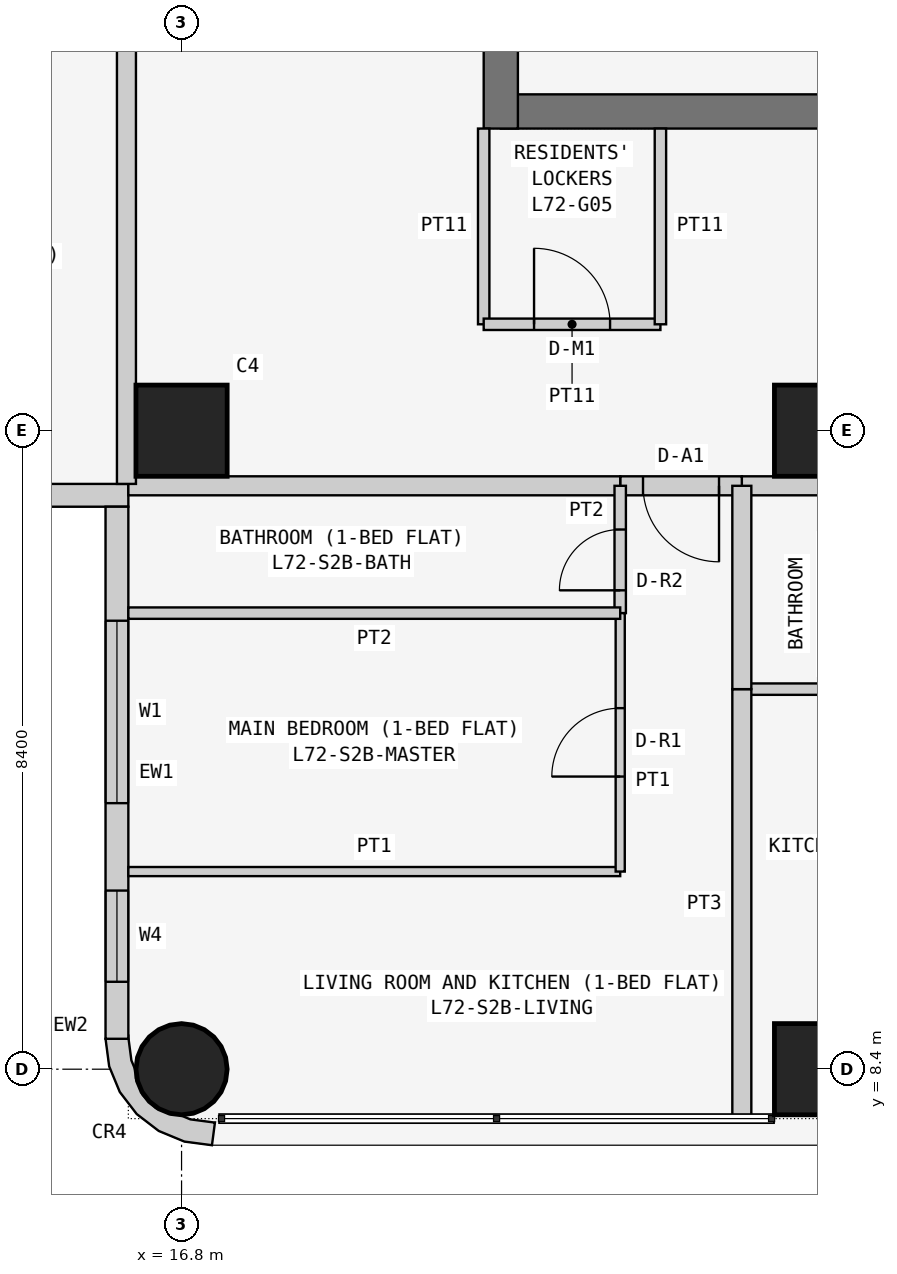
"""IFC4 building model, lengths in metres.
Left out: names, types, materials, properties, quantities, classifications, styles, units other than length and angle.
Written with IfcOpenShell. Run it as: python <this file> out.ifc"""

import sys

from ifc_helpers import new_model, si_unit, direction, frame, frame_2d, origin, origin_2d, place, context, subcontext, project, spatial, polyline, rectangle, circle, outline, extrude, element, fill, save


model = new_model("IFC4")
c1 = context("Model", 3, precision=1e-05, world=origin(), true_north=direction((0.0, 1.0)))
c2 = subcontext(c1, "Body", "Model", "MODEL_VIEW")
j1 = project(units=[si_unit("LENGTHUNIT", "METRE"), si_unit("PLANEANGLEUNIT", "RADIAN")], contexts=[c1])
p1 = place(None, origin())
s1 = spatial("IfcSite", under=j1, at=p1, CompositionType="ELEMENT")
p2 = place(p1, origin())
s2 = spatial("IfcBuilding", under=s1, at=p2, CompositionType="ELEMENT")
p3 = place(p2, frame((0.0, 0.0, 275.7)))
s3 = spatial("IfcBuildingStorey", under=s2, at=p3, CompositionType="ELEMENT", Elevation=275.7)
p4 = place(p3, frame((16.8, 8.4, 0.0), z_axis=(0.0, 0.0, 1.0), x_axis=(1.0, 0.0, 0.0)))
e1 = element("IfcColumn", 1, at=p4, inside=s3, PredefinedType="COLUMN", context=c2, shape_type="SweptSolid", body=[
    extrude(circle(Radius=0.6, at=origin_2d()), origin(), (0.0, 0.0, 1.0), 3.6),
])
for number, where, z_axis, x_axis in (
    (2, (16.8, 16.8, 0.0), (0.0, 0.0, 1.0), (1.0, 0.0, 0.0)),
    (3, (25.2, 8.4, 0.0), (0.0, 0.0, 1.0), (1.0, 0.0, 0.0)),
    (4, (25.2, 16.8, 0.0), (0.0, 0.0, 1.0), (1.0, 0.0, 0.0)),
):
    element("IfcColumn", number, at=place(p3, frame(where, z_axis=z_axis, x_axis=x_axis)), inside=s3, PredefinedType="COLUMN", context=c2, shape_type="SweptSolid", body=[
        extrude(rectangle(XDim=1.2, YDim=1.2, at=origin_2d()), origin(), (0.0, 0.0, 1.0), 3.6),
    ])
p5 = place(p3, frame((21.0, 21.0, 0.0), z_axis=(0.0, 0.0, 1.0), x_axis=(1.0, 0.0, 0.0)))
e5 = element("IfcWall", 5, at=p5, inside=s3, PredefinedType="SHEAR", context=c2, shape_type="SweptSolid", body=[
    extrude(rectangle(XDim=17.025, YDim=0.45, at=frame_2d((8.512, 0.0))), origin(), (0.0, 0.0, 1.0), 3.6),
])
p6 = place(p3, frame((21.0, 37.8, 0.0), z_axis=(0.0, 0.0, 1.0), x_axis=(0.0, -1.0, 0.0)))
e6 = element("IfcWall", 6, at=p6, inside=s3, PredefinedType="SHEAR", context=c2, shape_type="SweptSolid", body=[
    extrude(rectangle(XDim=17.025, YDim=0.45, at=frame_2d((8.513, 0.0))), origin(), (0.0, 0.0, 1.0), 3.6),
])
p7 = place(p6, frame((5.4, 0.0, 0.0)))
e7 = element("IfcOpeningElement", 7, at=p7, cuts=e6, PredefinedType="OPENING", context=c2, shape_type="SweptSolid", body=[
    extrude(rectangle(XDim=1.2, YDim=2.1, at=frame_2d((0.6, 1.05))), frame((0.0, 0.235, 0.0), z_axis=(0.0, -1.0, 0.0), x_axis=(1.0, 0.0, 0.0)), (0.0, 0.0, 1.0), 0.47),
])
p8 = place(p3, frame((8.8, 15.95, 0.0), z_axis=(0.0, 0.0, 1.0), x_axis=(1.0, 0.0, 0.0)))
e8 = element("IfcWall", 8, at=p8, inside=s3, PredefinedType="SOLIDWALL", context=c2, shape_type="SweptSolid", body=[
    extrude(rectangle(XDim=7.3, YDim=0.3, at=frame_2d((3.65, 0.0))), origin(), (0.0, 0.0, 1.0), 3.45),
])
p9 = place(p8, frame((3.1, 0.0, 0.9)))
e9 = element("IfcOpeningElement", 9, at=p9, cuts=e8, PredefinedType="OPENING", context=c2, shape_type="SweptSolid", body=[
    extrude(rectangle(XDim=2.4, YDim=1.5, at=frame_2d((1.2, 0.75))), frame((0.0, 0.16, 0.0), z_axis=(0.0, -1.0, 0.0), x_axis=(1.0, 0.0, 0.0)), (0.0, 0.0, 1.0), 0.32),
])
p10 = place(p8, frame((0.75, 0.0, 0.9)))
e10 = element("IfcOpeningElement", 10, at=p10, cuts=e8, PredefinedType="OPENING", context=c2, shape_type="SweptSolid", body=[
    extrude(rectangle(XDim=1.2, YDim=1.5, at=frame_2d((0.6, 0.75))), frame((0.0, 0.16, 0.0), z_axis=(0.0, -1.0, 0.0), x_axis=(1.0, 0.0, 0.0)), (0.0, 0.0, 1.0), 0.32),
])
p11 = place(p3, frame((15.95, 15.8, 0.0), z_axis=(0.0, 0.0, 1.0), x_axis=(0.0, -1.0, 0.0)))
e11 = element("IfcWall", 11, at=p11, inside=s3, PredefinedType="SOLIDWALL", context=c2, shape_type="SweptSolid", body=[
    extrude(rectangle(XDim=7.0, YDim=0.3, at=frame_2d((3.5, 0.0))), origin(), (0.0, 0.0, 1.0), 3.45),
])
p12 = place(p11, frame((1.5, 0.0, 0.9)))
e12 = element("IfcOpeningElement", 12, at=p12, cuts=e11, PredefinedType="OPENING", context=c2, shape_type="SweptSolid", body=[
    extrude(rectangle(XDim=2.4, YDim=1.5, at=frame_2d((1.2, 0.75))), frame((0.0, 0.16, 0.0), z_axis=(0.0, -1.0, 0.0), x_axis=(1.0, 0.0, 0.0)), (0.0, 0.0, 1.0), 0.32),
])
p13 = place(p11, frame((5.05, 0.0, 0.9)))
e13 = element("IfcOpeningElement", 13, at=p13, cuts=e11, PredefinedType="OPENING", context=c2, shape_type="SweptSolid", body=[
    extrude(rectangle(XDim=1.2, YDim=1.5, at=frame_2d((0.6, 0.75))), frame((0.0, 0.16, 0.0), z_axis=(0.0, -1.0, 0.0), x_axis=(1.0, 0.0, 0.0)), (0.0, 0.0, 1.0), 0.32),
])
p14 = place(p3, frame((16.224, 8.762, 0.0), z_axis=(0.0, 0.0, 1.0), x_axis=(-0.707106781187, -0.707106781187, 0.0)))
e14 = element("IfcWall", 14, at=p14, inside=s3, PredefinedType="SOLIDWALL", context=c2, shape_type="SweptSolid", body=[
    extrude(outline(polyline([(0.033, 1.469), (0.047, 1.455), (0.233, 1.212), (0.292, 1.069), (0.358, 1.003), (0.449, 0.783), (0.449, 0.543), (0.358, 0.322), (0.292, 0.257), (0.233, 0.114), (0.047, -0.129), (0.033, -0.143), (0.273, -0.327), (0.495, -0.037), (0.635, 0.3), (0.683, 0.663), (0.635, 1.025), (0.495, 1.363), (0.273, 1.653), (0.033, 1.469)])), origin(), (0.0, 0.0, 1.0), 3.45),
])
p15 = place(p3, frame((20.775, 20.775, 0.0), z_axis=(0.0, 0.0, 1.0), x_axis=(0.0, -1.0, 0.0)))
e15 = element("IfcWall", 15, at=p15, inside=s3, PredefinedType="PARTITIONING", context=c2, shape_type="SweptSolid", body=[
    extrude(rectangle(XDim=2.575, YDim=0.15, at=frame_2d((1.288, 0.0))), origin(), (0.0, 0.0, 1.0), 3.45),
])
p16 = place(p3, frame((20.775, 18.2, 0.0), z_axis=(0.0, 0.0, 1.0), x_axis=(1.0, 0.0, 0.0)))
e16 = element("IfcWall", 16, at=p16, inside=s3, PredefinedType="PARTITIONING", context=c2, shape_type="SweptSolid", body=[
    extrude(rectangle(XDim=2.325, YDim=0.15, at=frame_2d((1.163, 0.0))), origin(), (0.0, 0.0, 1.0), 3.45),
])
p17 = place(p16, frame((0.663, 0.0, 0.0)))
e17 = element("IfcOpeningElement", 17, at=p17, cuts=e16, PredefinedType="OPENING", context=c2, shape_type="SweptSolid", body=[
    extrude(rectangle(XDim=1.0, YDim=2.1, at=frame_2d((0.5, 1.05))), frame((0.0, 0.085, 0.0), z_axis=(0.0, -1.0, 0.0), x_axis=(1.0, 0.0, 0.0)), (0.0, 0.0, 1.0), 0.17),
])
p18 = place(p3, frame((23.1, 18.2, 0.0), z_axis=(0.0, 0.0, 1.0), x_axis=(0.0, 1.0, 0.0)))
e18 = element("IfcWall", 18, at=p18, inside=s3, PredefinedType="PARTITIONING", context=c2, shape_type="SweptSolid", body=[
    extrude(rectangle(XDim=2.575, YDim=0.15, at=frame_2d((1.288, 0.0))), origin(), (0.0, 0.0, 1.0), 3.45),
])
p19 = place(p3, frame((26.8, 16.075, 0.0), z_axis=(0.0, 0.0, 1.0), x_axis=(-1.0, 0.0, 0.0)))
e19 = element("IfcWall", 19, at=p19, inside=s3, PredefinedType="PARTITIONING", context=c2, shape_type="SweptSolid", body=[
    extrude(rectangle(XDim=2.629, YDim=0.25, at=frame_2d((1.314, 0.0))), origin(), (0.0, 0.0, 1.0), 3.45),
])
p20 = place(p3, frame((24.171, 16.075, 0.0), z_axis=(0.0, 0.0, 1.0), x_axis=(-1.0, 0.0, 0.0)))
e20 = element("IfcWall", 20, at=p20, inside=s3, PredefinedType="PARTITIONING", context=c2, shape_type="SweptSolid", body=[
    extrude(rectangle(XDim=1.6, YDim=0.25, at=frame_2d((0.8, 0.0))), origin(), (0.0, 0.0, 1.0), 3.45),
])
p21 = place(p20, frame((0.3, 0.0, 0.0)))
e21 = element("IfcOpeningElement", 21, at=p21, cuts=e20, PredefinedType="OPENING", context=c2, shape_type="SweptSolid", body=[
    extrude(rectangle(XDim=1.0, YDim=2.1, at=frame_2d((0.5, 1.05))), frame((0.0, 0.135, 0.0), z_axis=(0.0, -1.0, 0.0), x_axis=(1.0, 0.0, 0.0)), (0.0, 0.0, 1.0), 0.27),
])
p22 = place(p3, frame((22.571, 16.075, 0.0), z_axis=(0.0, 0.0, 1.0), x_axis=(-1.0, 0.0, 0.0)))
e22 = element("IfcWall", 22, at=p22, inside=s3, PredefinedType="PARTITIONING", context=c2, shape_type="SweptSolid", body=[
    extrude(rectangle(XDim=6.471, YDim=0.25, at=frame_2d((3.235, 0.0))), origin(), (0.0, 0.0, 1.0), 3.45),
])
p23 = place(p3, frame((16.075, 16.1, 0.0), z_axis=(0.0, 0.0, 1.0), x_axis=(0.0, 1.0, 0.0)))
e23 = element("IfcWall", 23, at=p23, inside=s3, PredefinedType="PARTITIONING", context=c2, shape_type="SweptSolid", body=[
    extrude(rectangle(XDim=6.871, YDim=0.25, at=frame_2d((3.436, 0.0))), origin(), (0.0, 0.0, 1.0), 3.45),
])
p24 = place(p3, frame((24.171, 13.4, 0.0), z_axis=(0.0, 0.0, 1.0), x_axis=(1.0, 0.0, 0.0)))
e24 = element("IfcWall", 24, at=p24, inside=s3, PredefinedType="PARTITIONING", context=c2, shape_type="SweptSolid", body=[
    extrude(rectangle(XDim=2.629, YDim=0.15, at=frame_2d((1.314, 0.0))), origin(), (0.0, 0.0, 1.0), 3.45),
])
p25 = place(p3, frame((24.171, 7.75, 0.0), z_axis=(0.0, 0.0, 1.0), x_axis=(0.0, 1.0, 0.0)))
e25 = element("IfcWall", 25, at=p25, inside=s3, PredefinedType="PARTITIONING", context=c2, shape_type="SweptSolid", body=[
    extrude(rectangle(XDim=5.65, YDim=0.25, at=frame_2d((2.825, 0.0))), origin(), (0.0, 0.0, 1.0), 3.45),
])
p26 = place(p3, frame((24.171, 13.4, 0.0), z_axis=(0.0, 0.0, 1.0), x_axis=(0.0, 1.0, 0.0)))
e26 = element("IfcWall", 26, at=p26, inside=s3, PredefinedType="PARTITIONING", context=c2, shape_type="SweptSolid", body=[
    extrude(rectangle(XDim=2.675, YDim=0.25, at=frame_2d((1.337, 0.0))), origin(), (0.0, 0.0, 1.0), 3.45),
])
p27 = place(p3, frame((22.571, 14.4, 0.0), z_axis=(0.0, 0.0, 1.0), x_axis=(0.0, 1.0, 0.0)))
e27 = element("IfcWall", 27, at=p27, inside=s3, PredefinedType="PARTITIONING", context=c2, shape_type="SweptSolid", body=[
    extrude(rectangle(XDim=1.675, YDim=0.15, at=frame_2d((0.837, 0.0))), origin(), (0.0, 0.0, 1.0), 3.45),
])
p28 = place(p27, frame((0.3, 0.0, 0.0)))
e28 = element("IfcOpeningElement", 28, at=p28, cuts=e27, PredefinedType="OPENING", context=c2, shape_type="SweptSolid", body=[
    extrude(rectangle(XDim=0.8, YDim=2.1, at=frame_2d((0.4, 1.05))), frame((0.0, 0.085, 0.0), z_axis=(0.0, -1.0, 0.0), x_axis=(1.0, 0.0, 0.0)), (0.0, 0.0, 1.0), 0.17),
])
p29 = place(p3, frame((16.1, 11.0, 0.0), z_axis=(0.0, 0.0, 1.0), x_axis=(1.0, 0.0, 0.0)))
e29 = element("IfcWall", 29, at=p29, inside=s3, PredefinedType="PARTITIONING", context=c2, shape_type="SweptSolid", body=[
    extrude(rectangle(XDim=6.471, YDim=0.12, at=frame_2d((3.235, 0.0))), origin(), (0.0, 0.0, 1.0), 3.45),
])
p30 = place(p3, frame((22.571, 11.0, 0.0), z_axis=(0.0, 0.0, 1.0), x_axis=(0.0, 1.0, 0.0)))
e30 = element("IfcWall", 30, at=p30, inside=s3, PredefinedType="PARTITIONING", context=c2, shape_type="SweptSolid", body=[
    extrude(rectangle(XDim=3.4, YDim=0.12, at=frame_2d((1.7, 0.0))), origin(), (0.0, 0.0, 1.0), 3.45),
])
p31 = place(p30, frame((1.25, 0.0, 0.0)))
e31 = element("IfcOpeningElement", 31, at=p31, cuts=e30, PredefinedType="OPENING", context=c2, shape_type="SweptSolid", body=[
    extrude(rectangle(XDim=0.9, YDim=2.1, at=frame_2d((0.45, 1.05))), frame((0.0, 0.07, 0.0), z_axis=(0.0, -1.0, 0.0), x_axis=(1.0, 0.0, 0.0)), (0.0, 0.0, 1.0), 0.14),
])
p32 = place(p3, frame((22.571, 14.4, 0.0), z_axis=(0.0, 0.0, 1.0), x_axis=(-1.0, 0.0, 0.0)))
e32 = element("IfcWall", 32, at=p32, inside=s3, PredefinedType="PARTITIONING", context=c2, shape_type="SweptSolid", body=[
    extrude(rectangle(XDim=6.471, YDim=0.15, at=frame_2d((3.235, 0.0))), origin(), (0.0, 0.0, 1.0), 3.45),
])
p33 = place(p12, origin())
e33 = element("IfcWindow", 33, at=p33, inside=s3, PartitioningType="SINGLE_PANEL", PredefinedType="WINDOW", context=c2, shape_type="SweptSolid", body=[
    extrude(rectangle(XDim=2.4, YDim=1.5, at=frame_2d((1.2, 0.75))), frame((0.0, 0.03, 0.0), z_axis=(0.0, -1.0, 0.0), x_axis=(1.0, 0.0, 0.0)), (0.0, 0.0, 1.0), 0.06),
])
fill(e12, e33)
p34 = place(p13, origin())
e34 = element("IfcWindow", 34, at=p34, inside=s3, PartitioningType="SINGLE_PANEL", PredefinedType="WINDOW", context=c2, shape_type="SweptSolid", body=[
    extrude(rectangle(XDim=1.2, YDim=1.5, at=frame_2d((0.6, 0.75))), frame((0.0, 0.03, 0.0), z_axis=(0.0, -1.0, 0.0), x_axis=(1.0, 0.0, 0.0)), (0.0, 0.0, 1.0), 0.06),
])
fill(e13, e34)
p35 = place(p17, origin())
e35 = element("IfcDoor", 35, at=p35, inside=s3, OperationType="SINGLE_SWING_LEFT", PredefinedType="DOOR", context=c2, shape_type="SweptSolid", body=[
    extrude(rectangle(XDim=1.0, YDim=2.1, at=frame_2d((0.5, 1.05))), frame((0.0, 0.025, 0.0), z_axis=(0.0, -1.0, 0.0), x_axis=(1.0, 0.0, 0.0)), (0.0, 0.0, 1.0), 0.05),
])
fill(e17, e35)
p36 = place(p21, origin())
e36 = element("IfcDoor", 36, at=p36, inside=s3, OperationType="SINGLE_SWING_LEFT", PredefinedType="DOOR", context=c2, shape_type="SweptSolid", body=[
    extrude(rectangle(XDim=1.0, YDim=2.1, at=frame_2d((0.5, 1.05))), frame((0.0, 0.025, 0.0), z_axis=(0.0, -1.0, 0.0), x_axis=(1.0, 0.0, 0.0)), (0.0, 0.0, 1.0), 0.05),
])
fill(e21, e36)
p37 = place(p28, origin())
e37 = element("IfcDoor", 37, at=p37, inside=s3, OperationType="SINGLE_SWING_LEFT", PredefinedType="DOOR", context=c2, shape_type="SweptSolid", body=[
    extrude(rectangle(XDim=0.8, YDim=2.1, at=frame_2d((0.4, 1.05))), frame((0.0, 0.025, 0.0), z_axis=(0.0, -1.0, 0.0), x_axis=(1.0, 0.0, 0.0)), (0.0, 0.0, 1.0), 0.05),
])
fill(e28, e37)
p38 = place(p31, origin())
e38 = element("IfcDoor", 38, at=p38, inside=s3, OperationType="SINGLE_SWING_LEFT", PredefinedType="DOOR", context=c2, shape_type="SweptSolid", body=[
    extrude(rectangle(XDim=0.9, YDim=2.1, at=frame_2d((0.45, 1.05))), frame((0.0, 0.025, 0.0), z_axis=(0.0, -1.0, 0.0), x_axis=(1.0, 0.0, 0.0)), (0.0, 0.0, 1.0), 0.05),
])
fill(e31, e38)
save(model, sys.argv[1])
